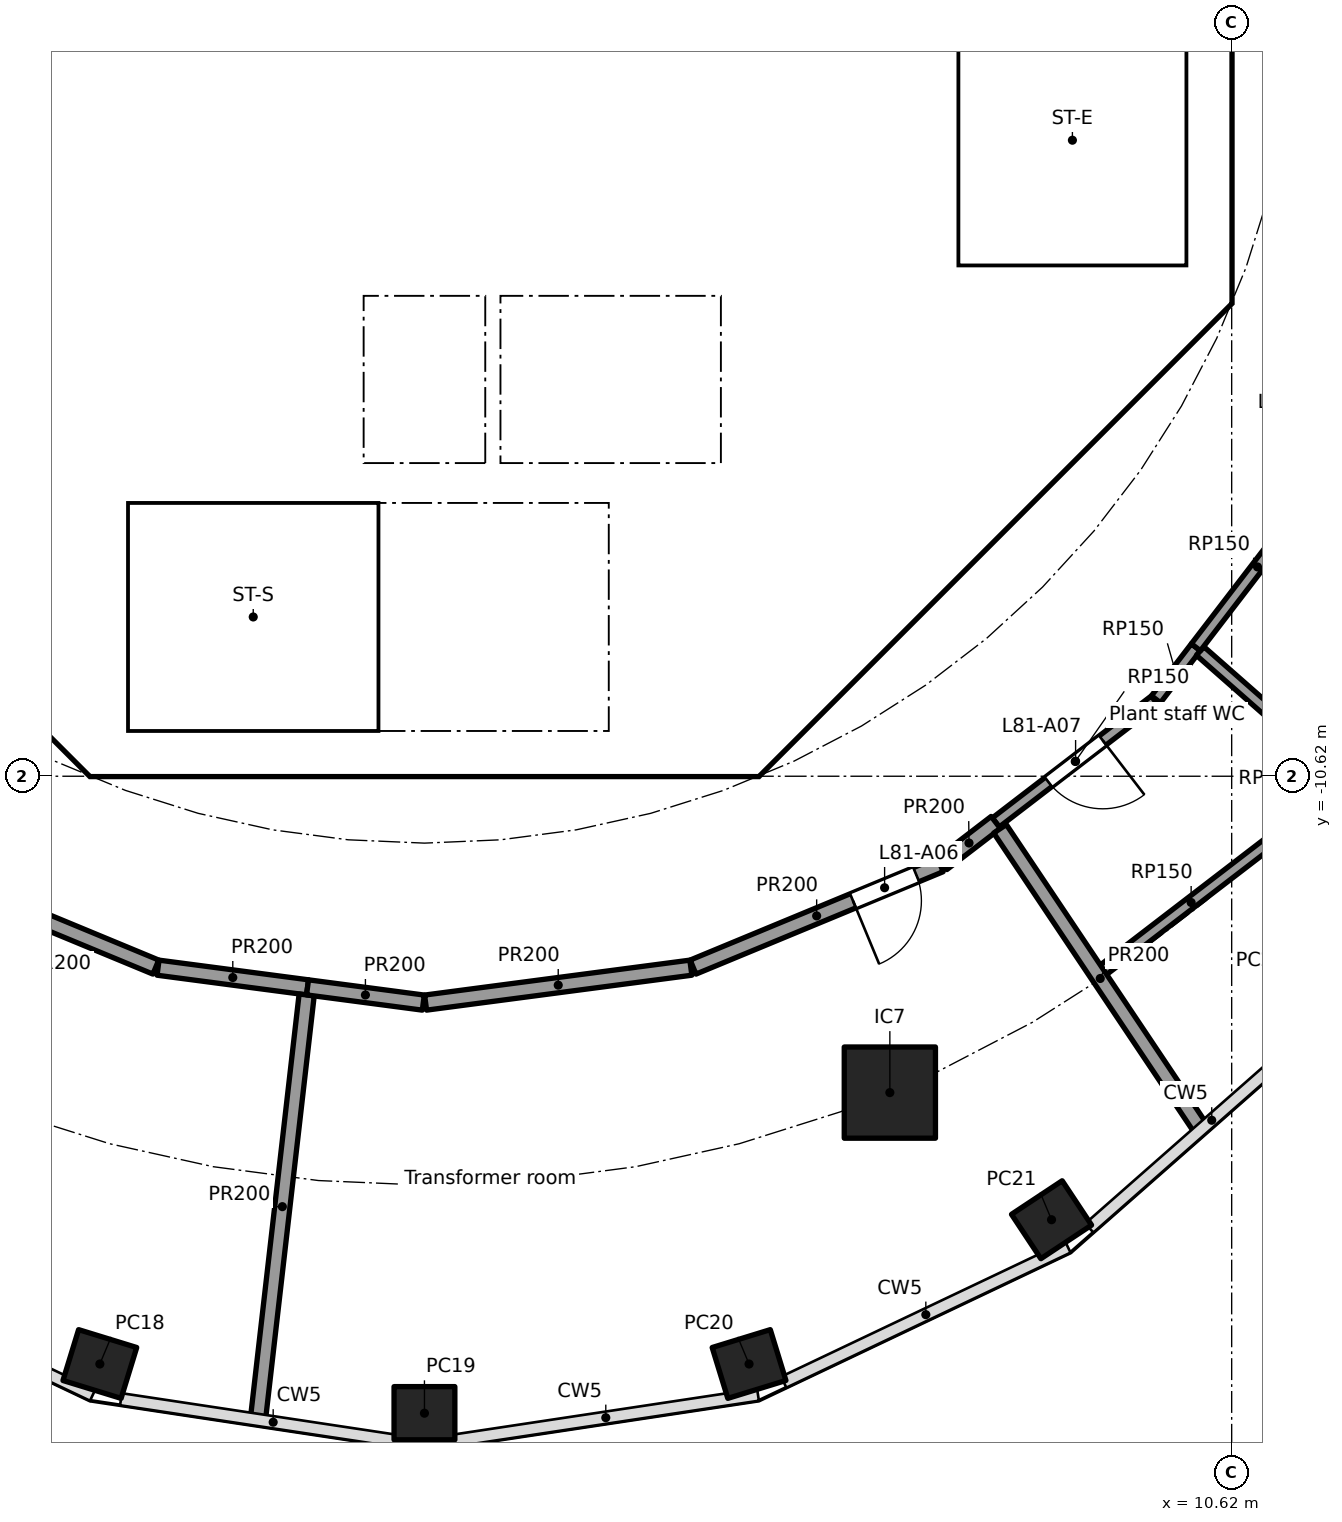
"""IFC4 building model, lengths in metres.
Left out: names, types, materials, properties, quantities, classifications, styles, units other than length and angle.
Written with IfcOpenShell. Run it as: python <this file> out.ifc"""

import sys

from ifc_helpers import new_model, si_unit, direction, frame, frame_2d, origin, origin_2d, place, context, subcontext, project, spatial, polyline, rectangle, hollow_rectangle, outline, extrude, element, fill, save


model = new_model("IFC4")
c1 = context("Model", 3, precision=1e-05, world=origin(), true_north=direction((0.0, 1.0)))
c2 = subcontext(c1, "Body", "Model", "MODEL_VIEW")
j1 = project(units=[si_unit("LENGTHUNIT", "METRE"), si_unit("PLANEANGLEUNIT", "RADIAN")], contexts=[c1])
p1 = place(None, origin())
s1 = spatial("IfcSite", under=j1, at=p1, CompositionType="ELEMENT")
p2 = place(p1, origin())
s2 = spatial("IfcBuilding", under=s1, at=p2, CompositionType="ELEMENT")
p3 = place(p2, frame((0.0, 0.0, 328.9)))
s3 = spatial("IfcBuildingStorey", under=s2, at=p3, CompositionType="ELEMENT", Elevation=328.9)
for number, where, z_axis, x_axis in (
    (1, (-4.271, -18.353, 0.0), (0.0, 0.0, 1.0), (0.956, -0.294, 0.0)),
    (2, (0.0, -19.0, 0.0), (0.0, 0.0, 1.0), (1.0, 0.0, 0.0)),
    (3, (4.271, -18.353, 0.0), (0.0, 0.0, 1.0), (0.956, 0.294, 0.0)),
    (4, (8.25, -16.455, 0.0), (0.0, 0.0, 1.0), (0.834, 0.552, 0.0)),
):
    element("IfcColumn", number, at=place(p3, frame(where, z_axis=z_axis, x_axis=x_axis)), inside=s3, PredefinedType="COLUMN", context=c2, shape_type="SweptSolid", body=[
        extrude(hollow_rectangle(XDim=0.8, YDim=0.7, WallThickness=0.025, at=origin_2d()), origin(), (0.0, 0.0, 1.0), 4.0),
    ])
p4 = place(p3, frame((6.123, -14.782, 0.0), z_axis=(0.0, 0.0, 1.0), x_axis=(1.0, 0.0, 0.0)))
e5 = element("IfcColumn", 5, at=p4, inside=s3, PredefinedType="COLUMN", context=c2, shape_type="SweptSolid", body=[
    extrude(rectangle(XDim=1.2, YDim=1.2, at=origin_2d()), origin(), (0.0, 0.0, 1.0), 4.0),
])
p5 = place(p3, frame((-9.988, -4.613, 0.0), z_axis=(0.0, 0.0, 1.0), x_axis=(0.707106781187, -0.707106781187, 0.0)))
e6 = element("IfcWall", 6, at=p5, inside=s3, PredefinedType="SHEAR", context=c2, shape_type="SweptSolid", body=[
    extrude(rectangle(XDim=7.602, YDim=0.6, at=frame_2d((3.801, 0.0))), origin(), (0.0, 0.0, 1.0), 3.7),
])
p6 = place(p5, frame((6.151, 0.0, 0.0)))
e7 = element("IfcOpeningElement", 7, at=p6, cuts=e6, PredefinedType="OPENING", context=c2, shape_type="SweptSolid", body=[
    extrude(rectangle(XDim=1.1, YDim=2.1, at=frame_2d((0.55, 1.05))), frame((0.0, 0.31, 0.0), z_axis=(0.0, -1.0, 0.0), x_axis=(1.0, 0.0, 0.0)), (0.0, 0.0, 1.0), 0.62),
])
p7 = place(p3, frame((4.613, -9.988, 0.0), z_axis=(0.0, 0.0, 1.0), x_axis=(0.707106781187, 0.707106781187, 0.0)))
e8 = element("IfcWall", 8, at=p7, inside=s3, PredefinedType="SHEAR", context=c2, shape_type="SweptSolid", body=[
    extrude(rectangle(XDim=7.602, YDim=0.6, at=frame_2d((3.801, 0.0))), origin(), (0.0, 0.0, 1.0), 3.7),
])
p8 = place(p7, frame((3.201, 0.0, 0.0)))
e9 = element("IfcOpeningElement", 9, at=p8, cuts=e8, PredefinedType="OPENING", context=c2, shape_type="SweptSolid", body=[
    extrude(rectangle(XDim=1.2, YDim=2.1, at=frame_2d((0.6, 1.05))), frame((0.0, 0.31, 0.0), z_axis=(0.0, -1.0, 0.0), x_axis=(1.0, 0.0, 0.0)), (0.0, 0.0, 1.0), 0.62),
])
p9 = place(p3, frame((4.0, -10.025, 0.0), z_axis=(0.0, 0.0, 1.0), x_axis=(0.0, 1.0, 0.0)))
e10 = element("IfcWall", 10, at=p9, inside=s3, PredefinedType="SOLIDWALL", context=c2, shape_type="SweptSolid", body=[
    extrude(rectangle(XDim=3.0, YDim=0.2, at=frame_2d((1.5, 0.0))), origin(), (0.0, 0.0, 1.0), 3.7),
])
p10 = place(p9, frame((0.975, 0.0, 0.0)))
e11 = element("IfcOpeningElement", 11, at=p10, cuts=e10, PredefinedType="OPENING", context=c2, shape_type="SweptSolid", body=[
    extrude(rectangle(XDim=1.1, YDim=2.1, at=frame_2d((0.55, 1.05))), frame((0.0, 0.11, 0.0), z_axis=(0.0, -1.0, 0.0), x_axis=(1.0, 0.0, 0.0)), (0.0, 0.0, 1.0), 0.22),
])
p11 = place(p3, frame((4.0, -6.5, 0.0), z_axis=(0.0, 0.0, 1.0), x_axis=(0.0, 1.0, 0.0)))
e12 = element("IfcWall", 12, at=p11, inside=s3, PredefinedType="SOLIDWALL", context=c2, shape_type="SweptSolid", body=[
    extrude(rectangle(XDim=2.2, YDim=0.2, at=frame_2d((1.1, 0.0))), origin(), (0.0, 0.0, 1.0), 3.7),
])
p12 = place(p11, frame((0.55, 0.0, 0.0)))
e13 = element("IfcOpeningElement", 13, at=p12, cuts=e12, PredefinedType="OPENING", context=c2, shape_type="SweptSolid", body=[
    extrude(rectangle(XDim=1.1, YDim=2.1, at=frame_2d((0.55, 1.05))), frame((0.0, 0.11, 0.0), z_axis=(0.0, -1.0, 0.0), x_axis=(1.0, 0.0, 0.0)), (0.0, 0.0, 1.0), 0.22),
])
p13 = place(p3, frame((-4.0, -6.5, 0.0), z_axis=(0.0, 0.0, 1.0), x_axis=(0.0, 1.0, 0.0)))
e14 = element("IfcWall", 14, at=p13, inside=s3, PredefinedType="SOLIDWALL", context=c2, shape_type="SweptSolid", body=[
    extrude(rectangle(XDim=2.2, YDim=0.2, at=frame_2d((1.1, 0.0))), origin(), (0.0, 0.0, 1.0), 3.7),
])
p14 = place(p13, frame((0.65, 0.0, 0.0)))
e15 = element("IfcOpeningElement", 15, at=p14, cuts=e14, PredefinedType="OPENING", context=c2, shape_type="SweptSolid", body=[
    extrude(rectangle(XDim=0.9, YDim=2.1, at=frame_2d((0.45, 1.05))), frame((0.0, 0.11, 0.0), z_axis=(0.0, -1.0, 0.0), x_axis=(1.0, 0.0, 0.0)), (0.0, 0.0, 1.0), 0.22),
])
p15 = place(p3, frame((-6.7, -2.0, 0.0), z_axis=(0.0, 0.0, 1.0), x_axis=(1.0, 0.0, 0.0)))
e16 = element("IfcWall", 16, at=p15, inside=s3, PredefinedType="SOLIDWALL", context=c2, shape_type="SweptSolid", body=[
    extrude(rectangle(XDim=13.4, YDim=0.2, at=frame_2d((6.7, 0.0))), origin(), (0.0, 0.0, 1.0), 3.7),
])
p16 = place(p15, frame((1.85, 0.0, 0.0)))
e17 = element("IfcOpeningElement", 17, at=p16, cuts=e16, PredefinedType="OPENING", context=c2, shape_type="SweptSolid", body=[
    extrude(rectangle(XDim=0.9, YDim=2.1, at=frame_2d((0.45, 1.05))), frame((0.0, 0.11, 0.0), z_axis=(0.0, -1.0, 0.0), x_axis=(1.0, 0.0, 0.0)), (0.0, 0.0, 1.0), 0.22),
])
p17 = place(p15, frame((5.15, 0.0, 0.0)))
e18 = element("IfcOpeningElement", 18, at=p17, cuts=e16, PredefinedType="OPENING", context=c2, shape_type="SweptSolid", body=[
    extrude(rectangle(XDim=0.9, YDim=2.1, at=frame_2d((0.45, 1.05))), frame((0.0, 0.11, 0.0), z_axis=(0.0, -1.0, 0.0), x_axis=(1.0, 0.0, 0.0)), (0.0, 0.0, 1.0), 0.22),
])
p18 = place(p15, frame((7.35, 0.0, 0.0)))
e19 = element("IfcOpeningElement", 19, at=p18, cuts=e16, PredefinedType="OPENING", context=c2, shape_type="SweptSolid", body=[
    extrude(rectangle(XDim=0.9, YDim=2.1, at=frame_2d((0.45, 1.05))), frame((0.0, 0.11, 0.0), z_axis=(0.0, -1.0, 0.0), x_axis=(1.0, 0.0, 0.0)), (0.0, 0.0, 1.0), 0.22),
])
p19 = place(p15, frame((10.65, 0.0, 0.0)))
e20 = element("IfcOpeningElement", 20, at=p19, cuts=e16, PredefinedType="OPENING", context=c2, shape_type="SweptSolid", body=[
    extrude(rectangle(XDim=0.9, YDim=2.1, at=frame_2d((0.45, 1.05))), frame((0.0, 0.11, 0.0), z_axis=(0.0, -1.0, 0.0), x_axis=(1.0, 0.0, 0.0)), (0.0, 0.0, 1.0), 0.22),
])
p20 = place(p3, origin())
e21 = element("IfcWall", 21, at=p20, inside=s3, PredefinedType="SHEAR", context=c2, shape_type="SweptSolid", body=[
    extrude(outline(polyline([(-4.152, -10.025), (4.152, -10.025), (4.401, -9.776), (4.825, -10.2), (4.401, -10.625), (-4.401, -10.625), (-4.825, -10.2), (-4.401, -9.776), (-4.152, -10.025)])), origin(), (0.0, 0.0, 1.0), 3.7),
])
p21 = place(p3, origin())
e22 = element("IfcWall", 22, at=p21, inside=s3, PredefinedType="SHEAR", context=c2, shape_type="SweptSolid", body=[
    extrude(outline(polyline([(9.776, -4.401), (10.025, -4.152), (10.025, -3.801), (10.025, 4.152), (9.776, 4.401), (10.2, 4.825), (10.625, 4.401), (10.625, -4.401), (10.2, -4.825), (9.776, -4.401)])), origin(), (0.0, 0.0, 1.0), 3.7),
])
for number, where, z_axis, x_axis in (
    (23, (-0.9, -6.5, 0.0), (0.0, 0.0, 1.0), (0.0, 1.0, 0.0)),
    (24, (0.9, -6.5, 0.0), (0.0, 0.0, 1.0), (0.0, 1.0, 0.0)),
):
    element("IfcWall", number, at=place(p3, frame(where, z_axis=z_axis, x_axis=x_axis)), inside=s3, PredefinedType="SOLIDWALL", context=c2, shape_type="SweptSolid", body=[
        extrude(rectangle(XDim=2.2, YDim=0.2, at=frame_2d((1.1, 0.0))), origin(), (0.0, 0.0, 1.0), 3.7),
    ])
p22 = place(p3, origin())
e25 = element("IfcWall", 25, at=p22, inside=s3, PredefinedType="SOLIDWALL", context=c2, shape_type="SweptSolid", body=[
    extrude(outline(polyline([(-6.7, -2.1), (-6.5, -2.1), (-6.5, -4.1), (-2.3, -4.1), (-2.3, -2.1), (-2.1, -2.1), (-2.1, -4.1), (-0.1, -4.1), (-0.1, -2.1), (0.1, -2.1), (0.1, -4.1), (2.1, -4.1), (2.1, -2.1), (2.3, -2.1), (2.3, -4.1), (6.5, -4.1), (6.5, -2.1), (6.7, -2.1), (6.7, -4.3), (-6.7, -4.3), (-6.7, -2.1)])), origin(), (0.0, 0.0, 1.0), 3.7),
])
p23 = place(p3, origin())
e26 = element("IfcWall", 26, at=p23, inside=s3, PredefinedType="SOLIDWALL", context=c2, shape_type="SweptSolid", body=[
    extrude(outline(polyline([(-3.9, -10.025), (-4.1, -10.025), (-4.1, -7.025), (-3.9, -7.025), (-3.9, -10.025)])), origin(), (0.0, 0.0, 1.0), 3.7),
])
p24 = place(p3, origin())
e27 = element("IfcWall", 27, at=p24, inside=s3, PredefinedType="SOLIDWALL", context=c2, shape_type="SweptSolid", body=[
    extrude(outline(polyline([(4.1, -7.025), (-4.1, -7.025), (-4.1, -6.5), (4.1, -6.5), (4.1, -7.025)])), origin(), (0.0, 0.0, 1.0), 3.7),
])
p25 = place(p3, origin())
e28 = element("IfcWall", 28, at=p25, inside=s3, PredefinedType="SOLIDWALL", context=c2, shape_type="SweptSolid", body=[
    extrude(outline(polyline([(7.025, -3.9), (6.7, -3.9), (6.7, 3.9), (7.025, 3.9), (7.025, -3.9)])), origin(), (0.0, 0.0, 1.0), 3.7),
])
p26 = place(p3, origin())
e29 = element("IfcWall", 29, at=p26, inside=s3, PredefinedType="SOLIDWALL", context=c2, shape_type="SweptSolid", body=[
    extrude(outline(polyline([(10.025, -4.1), (6.7, -4.1), (6.7, -3.9), (10.025, -3.9), (10.025, -4.1)])), origin(), (0.0, 0.0, 1.0), 3.7),
])
p27 = place(p3, frame((9.607, -9.624, 0.0), z_axis=(0.0, 0.0, 1.0), x_axis=(-0.793381127635, -0.608725214126, 0.0)))
e30 = element("IfcWall", 30, at=p27, inside=s3, PredefinedType="PARTITIONING", context=c2, shape_type="SweptSolid", body=[
    extrude(rectangle(XDim=2.635, YDim=0.15, at=frame_2d((1.317, 0.0))), origin(), (0.0, 0.0, 1.0), 3.7),
])
p28 = place(p27, frame((0.862, 0.0, 0.0)))
e31 = element("IfcOpeningElement", 31, at=p28, cuts=e30, PredefinedType="OPENING", context=c2, shape_type="SweptSolid", body=[
    extrude(rectangle(XDim=0.9, YDim=2.1, at=frame_2d((0.45, 1.05))), frame((0.0, 0.085, 0.0), z_axis=(0.0, -1.0, 0.0), x_axis=(1.0, 0.0, 0.0)), (0.0, 0.0, 1.0), 0.17),
])
p29 = place(p3, frame((10.149, -8.923, 0.0), z_axis=(0.0, 0.0, 1.0), x_axis=(-0.608752479135, -0.793360207691, 0.0)))
e32 = element("IfcWall", 32, at=p29, inside=s3, PredefinedType="PARTITIONING", context=c2, shape_type="SweptSolid", body=[
    extrude(rectangle(XDim=0.862, YDim=0.15, at=frame_2d((0.431, 0.0))), origin(), (0.0, 0.0, 1.0), 3.7),
])
p30 = place(p3, frame((10.205, -8.973, 0.0), z_axis=(0.0, 0.0, 1.0), x_axis=(0.750971181711, -0.66033497881, 0.0)))
e33 = element("IfcWall", 33, at=p30, inside=s3, PredefinedType="PARTITIONING", context=c2, shape_type="SweptSolid", body=[
    extrude(rectangle(XDim=2.406, YDim=0.15, at=frame_2d((1.203, 0.0))), origin(), (0.0, 0.0, 1.0), 3.7),
])
p31 = place(p3, frame((11.319, -11.336, 0.0), z_axis=(0.0, 0.0, 1.0), x_axis=(-0.793397594576, -0.608703751361, 0.0)))
e34 = element("IfcWall", 34, at=p31, inside=s3, PredefinedType="PARTITIONING", context=c2, shape_type="SweptSolid", body=[
    extrude(rectangle(XDim=3.106, YDim=0.15, at=frame_2d((1.553, 0.0))), origin(), (0.0, 0.0, 1.0), 3.7),
])
p32 = place(p3, frame((11.771, -6.809, 0.0), z_axis=(0.0, 0.0, 1.0), x_axis=(-0.608731606531, -0.793376222993, 0.0)))
e35 = element("IfcWall", 35, at=p32, inside=s3, PredefinedType="PARTITIONING", context=c2, shape_type="SweptSolid", body=[
    extrude(rectangle(XDim=2.664, YDim=0.15, at=frame_2d((1.332, 0.0))), origin(), (0.0, 0.0, 1.0), 3.7),
])
p33 = place(p3, frame((-3.534, -13.131, 0.0), z_axis=(0.0, 0.0, 1.0), x_axis=(-0.92386297064, 0.382723413813, 0.0)))
e36 = element("IfcWall", 36, at=p33, inside=s3, PredefinedType="PARTITIONING", context=c2, shape_type="SweptSolid", body=[
    extrude(rectangle(XDim=3.52, YDim=0.2, at=frame_2d((1.76, 0.0))), origin(), (0.0, 0.0, 1.0), 3.7),
])
p34 = place(p33, frame((2.278, 0.0, 0.0)))
e37 = element("IfcOpeningElement", 37, at=p34, cuts=e36, PredefinedType="OPENING", context=c2, shape_type="SweptSolid", body=[
    extrude(rectangle(XDim=0.9, YDim=2.1, at=frame_2d((0.45, 1.05))), frame((0.0, 0.11, 0.0), z_axis=(0.0, -1.0, 0.0), x_axis=(1.0, 0.0, 0.0)), (0.0, 0.0, 1.0), 0.22),
])
p35 = place(p3, frame((-1.538, -13.397, 0.0), z_axis=(0.0, 0.0, 1.0), x_axis=(-0.991454295543, 0.130454512571, 0.0)))
e38 = element("IfcWall", 38, at=p35, inside=s3, PredefinedType="PARTITIONING", context=c2, shape_type="SweptSolid", body=[
    extrude(rectangle(XDim=1.984, YDim=0.2, at=frame_2d((0.992, 0.0))), origin(), (0.0, 0.0, 1.0), 3.7),
])
p36 = place(p3, frame((-1.55, -13.497, 0.0), z_axis=(0.0, 0.0, 1.0), x_axis=(-0.114057329834, -0.993474169524, 0.0)))
e39 = element("IfcWall", 39, at=p36, inside=s3, PredefinedType="PARTITIONING", context=c2, shape_type="SweptSolid", body=[
    extrude(rectangle(XDim=5.608, YDim=0.2, at=frame_2d((2.804, 0.0))), origin(), (0.0, 0.0, 1.0), 3.7),
])
p37 = place(p3, frame((-0.015, -13.598, 0.0), z_axis=(0.0, 0.0, 1.0), x_axis=(-0.991449967232, 0.13048740351, 0.0)))
e40 = element("IfcWall", 40, at=p37, inside=s3, PredefinedType="PARTITIONING", context=c2, shape_type="SweptSolid", body=[
    extrude(rectangle(XDim=1.536, YDim=0.2, at=frame_2d((0.768, 0.0))), origin(), (0.0, 0.0, 1.0), 3.7),
])
p38 = place(p3, frame((3.505, -13.139, 0.0), z_axis=(0.0, 0.0, 1.0), x_axis=(-0.991452406768, -0.130468866457, 0.0)))
e41 = element("IfcWall", 41, at=p38, inside=s3, PredefinedType="PARTITIONING", context=c2, shape_type="SweptSolid", body=[
    extrude(rectangle(XDim=3.52, YDim=0.2, at=frame_2d((1.76, 0.0))), origin(), (0.0, 0.0, 1.0), 3.7),
])
p39 = place(p3, frame((6.786, -11.784, 0.0), z_axis=(0.0, 0.0, 1.0), x_axis=(-0.92386297064, -0.382723413813, 0.0)))
e42 = element("IfcWall", 42, at=p39, inside=s3, PredefinedType="PARTITIONING", context=c2, shape_type="SweptSolid", body=[
    extrude(rectangle(XDim=3.52, YDim=0.2, at=frame_2d((1.76, 0.0))), origin(), (0.0, 0.0, 1.0), 3.7),
])
p40 = place(p39, frame((0.342, 0.0, 0.0)))
e43 = element("IfcOpeningElement", 43, at=p40, cuts=e42, PredefinedType="OPENING", context=c2, shape_type="SweptSolid", body=[
    extrude(rectangle(XDim=0.9, YDim=2.1, at=frame_2d((0.45, 1.05))), frame((0.0, 0.11, 0.0), z_axis=(0.0, -1.0, 0.0), x_axis=(1.0, 0.0, 0.0)), (0.0, 0.0, 1.0), 0.22),
])
p41 = place(p3, frame((7.517, -11.228, 0.0), z_axis=(0.0, 0.0, 1.0), x_axis=(-0.793420478802, -0.608673922407, 0.0)))
e44 = element("IfcWall", 44, at=p41, inside=s3, PredefinedType="PARTITIONING", context=c2, shape_type="SweptSolid", body=[
    extrude(rectangle(XDim=0.888, YDim=0.2, at=frame_2d((0.444, 0.0))), origin(), (0.0, 0.0, 1.0), 3.7),
])
p42 = place(p3, frame((10.209, -15.25, 0.0), z_axis=(0.0, 0.0, 1.0), x_axis=(-0.55629198168, 0.830986901893, 0.0)))
e45 = element("IfcWall", 45, at=p42, inside=s3, PredefinedType="PARTITIONING", context=c2, shape_type="SweptSolid", body=[
    extrude(rectangle(XDim=4.74, YDim=0.2, at=frame_2d((2.37, 0.0))), origin(), (0.0, 0.0, 1.0), 3.7),
])
p43 = place(p12, origin())
e46 = element("IfcDoor", 46, at=p43, inside=s3, OperationType="DOUBLE_DOOR_SLIDING", PredefinedType="DOOR", context=c2, shape_type="SweptSolid", body=[
    extrude(rectangle(XDim=1.1, YDim=2.1, at=frame_2d((0.55, 1.05))), frame((0.0, 0.025, 0.0), z_axis=(0.0, -1.0, 0.0), x_axis=(1.0, 0.0, 0.0)), (0.0, 0.0, 1.0), 0.05),
])
fill(e13, e46)
p44 = place(p10, origin())
e47 = element("IfcDoor", 47, at=p44, inside=s3, OperationType="SINGLE_SWING_RIGHT", PredefinedType="DOOR", context=c2, shape_type="SweptSolid", body=[
    extrude(rectangle(XDim=1.1, YDim=2.1, at=frame_2d((0.55, 1.05))), frame((0.0, 0.025, 0.0), z_axis=(0.0, -1.0, 0.0), x_axis=(1.0, 0.0, 0.0)), (0.0, 0.0, 1.0), 0.05),
])
fill(e11, e47)
p45 = place(p14, frame((0.9, 0.0, 0.0), x_axis=(-1.0, 0.0, 0.0)))
e48 = element("IfcDoor", 48, at=p45, inside=s3, OperationType="SINGLE_SWING_RIGHT", PredefinedType="DOOR", context=c2, shape_type="SweptSolid", body=[
    extrude(rectangle(XDim=0.9, YDim=2.1, at=frame_2d((0.45, 1.05))), frame((0.0, 0.025, 0.0), z_axis=(0.0, -1.0, 0.0), x_axis=(1.0, 0.0, 0.0)), (0.0, 0.0, 1.0), 0.05),
])
fill(e15, e48)
p46 = place(p16, frame((0.9, 0.0, 0.0), x_axis=(-1.0, 0.0, 0.0)))
e49 = element("IfcDoor", 49, at=p46, inside=s3, OperationType="SINGLE_SWING_RIGHT", PredefinedType="DOOR", context=c2, shape_type="SweptSolid", body=[
    extrude(rectangle(XDim=0.9, YDim=2.1, at=frame_2d((0.45, 1.05))), frame((0.0, 0.025, 0.0), z_axis=(0.0, -1.0, 0.0), x_axis=(1.0, 0.0, 0.0)), (0.0, 0.0, 1.0), 0.05),
])
fill(e17, e49)
p47 = place(p17, frame((0.9, 0.0, 0.0), x_axis=(-1.0, 0.0, 0.0)))
e50 = element("IfcDoor", 50, at=p47, inside=s3, OperationType="SINGLE_SWING_RIGHT", PredefinedType="DOOR", context=c2, shape_type="SweptSolid", body=[
    extrude(rectangle(XDim=0.9, YDim=2.1, at=frame_2d((0.45, 1.05))), frame((0.0, 0.025, 0.0), z_axis=(0.0, -1.0, 0.0), x_axis=(1.0, 0.0, 0.0)), (0.0, 0.0, 1.0), 0.05),
])
fill(e18, e50)
p48 = place(p18, frame((0.9, 0.0, 0.0), x_axis=(-1.0, 0.0, 0.0)))
e51 = element("IfcDoor", 51, at=p48, inside=s3, OperationType="SINGLE_SWING_RIGHT", PredefinedType="DOOR", context=c2, shape_type="SweptSolid", body=[
    extrude(rectangle(XDim=0.9, YDim=2.1, at=frame_2d((0.45, 1.05))), frame((0.0, 0.025, 0.0), z_axis=(0.0, -1.0, 0.0), x_axis=(1.0, 0.0, 0.0)), (0.0, 0.0, 1.0), 0.05),
])
fill(e19, e51)
p49 = place(p19, frame((0.9, 0.0, 0.0), x_axis=(-1.0, 0.0, 0.0)))
e52 = element("IfcDoor", 52, at=p49, inside=s3, OperationType="SINGLE_SWING_LEFT", PredefinedType="DOOR", context=c2, shape_type="SweptSolid", body=[
    extrude(rectangle(XDim=0.9, YDim=2.1, at=frame_2d((0.45, 1.05))), frame((0.0, 0.025, 0.0), z_axis=(0.0, -1.0, 0.0), x_axis=(1.0, 0.0, 0.0)), (0.0, 0.0, 1.0), 0.05),
])
fill(e20, e52)
p50 = place(p8, origin())
e53 = element("IfcDoor", 53, at=p50, inside=s3, OperationType="SINGLE_SWING_LEFT", PredefinedType="DOOR", context=c2, shape_type="SweptSolid", body=[
    extrude(rectangle(XDim=1.2, YDim=2.1, at=frame_2d((0.6, 1.05))), frame((0.0, 0.025, 0.0), z_axis=(0.0, -1.0, 0.0), x_axis=(1.0, 0.0, 0.0)), (0.0, 0.0, 1.0), 0.05),
])
fill(e9, e53)
p51 = place(p6, origin())
e54 = element("IfcDoor", 54, at=p51, inside=s3, OperationType="SINGLE_SWING_LEFT", PredefinedType="DOOR", context=c2, shape_type="SweptSolid", body=[
    extrude(rectangle(XDim=1.1, YDim=2.1, at=frame_2d((0.55, 1.05))), frame((0.0, 0.025, 0.0), z_axis=(0.0, -1.0, 0.0), x_axis=(1.0, 0.0, 0.0)), (0.0, 0.0, 1.0), 0.05),
])
fill(e7, e54)
p52 = place(p40, origin())
e55 = element("IfcDoor", 55, at=p52, inside=s3, OperationType="SINGLE_SWING_RIGHT", PredefinedType="DOOR", context=c2, shape_type="SweptSolid", body=[
    extrude(rectangle(XDim=0.9, YDim=2.1, at=frame_2d((0.45, 1.05))), frame((0.0, 0.025, 0.0), z_axis=(0.0, -1.0, 0.0), x_axis=(1.0, 0.0, 0.0)), (0.0, 0.0, 1.0), 0.05),
])
fill(e43, e55)
p53 = place(p28, origin())
e56 = element("IfcDoor", 56, at=p53, inside=s3, OperationType="SINGLE_SWING_LEFT", PredefinedType="DOOR", context=c2, shape_type="SweptSolid", body=[
    extrude(rectangle(XDim=0.9, YDim=2.1, at=frame_2d((0.45, 1.05))), frame((0.0, 0.025, 0.0), z_axis=(0.0, -1.0, 0.0), x_axis=(1.0, 0.0, 0.0)), (0.0, 0.0, 1.0), 0.05),
])
fill(e31, e56)
save(model, sys.argv[1])
